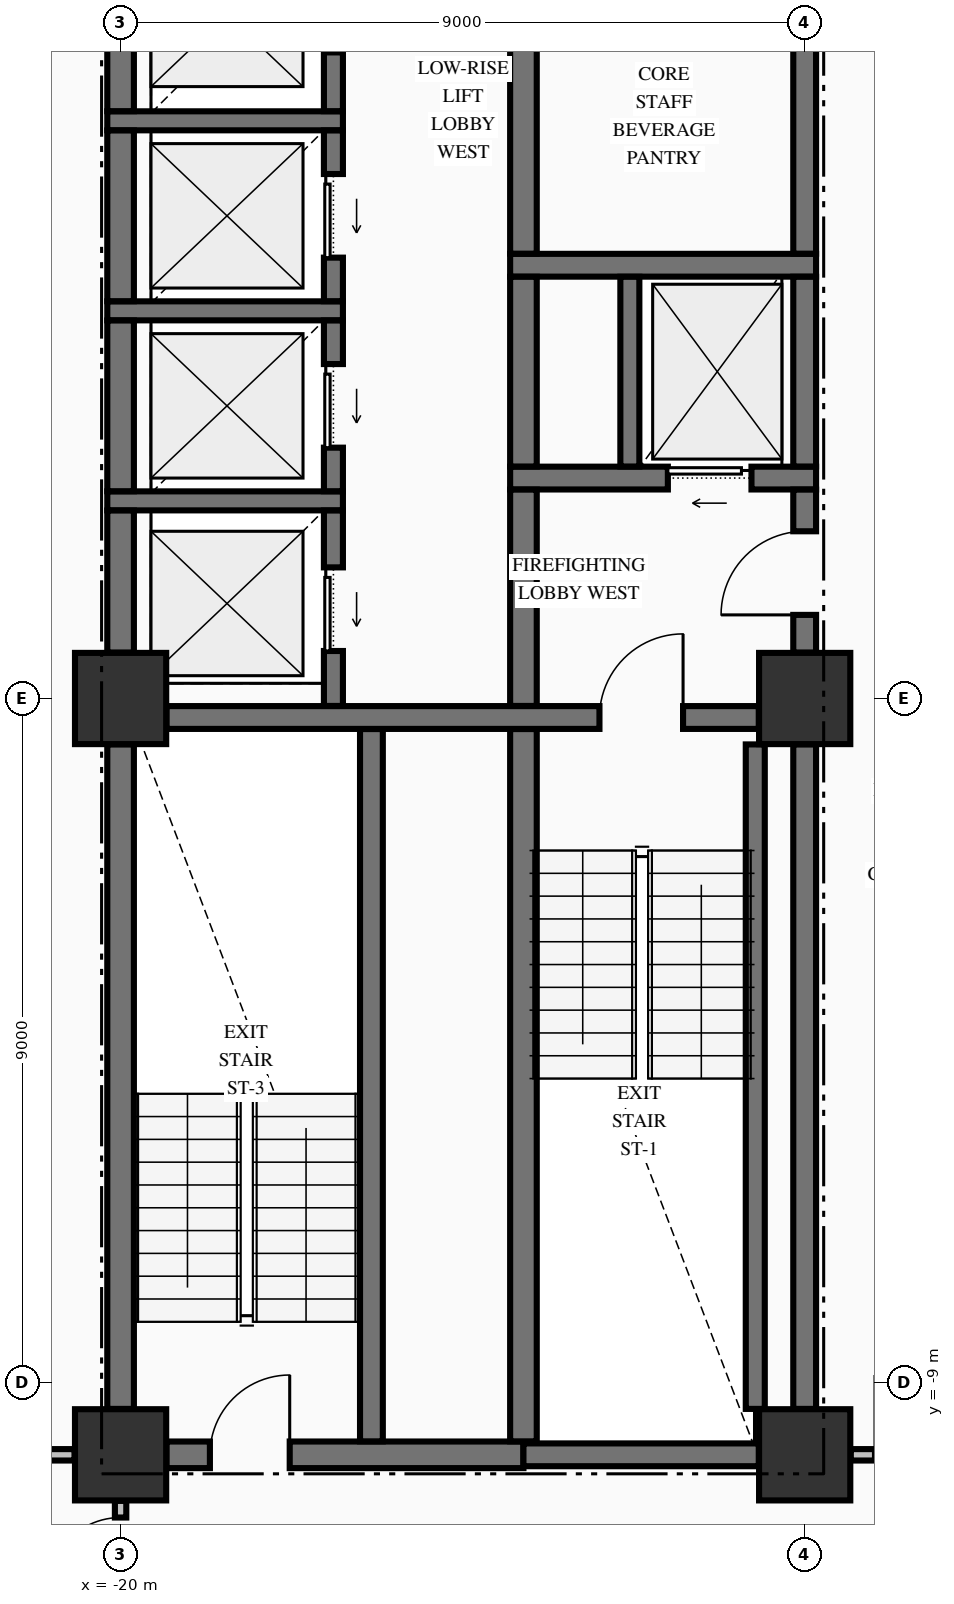
"""IFC4 building model, lengths in metres.
Left out: names, types, materials, properties, quantities, classifications, styles, units other than length and angle.
Written with IfcOpenShell. Run it as: python <this file> out.ifc"""

import sys

from ifc_helpers import new_model, si_unit, direction, frame, frame_2d, origin, origin_2d, place, context, subcontext, project, spatial, rectangle, extrude, element, fill, save


model = new_model("IFC4")
c1 = context("Model", 3, precision=1e-05, world=origin(), true_north=direction((0.0, 1.0)))
c2 = subcontext(c1, "Body", "Model", "MODEL_VIEW")
j1 = project(units=[si_unit("LENGTHUNIT", "METRE"), si_unit("PLANEANGLEUNIT", "RADIAN")], contexts=[c1])
p1 = place(None, origin())
s1 = spatial("IfcSite", under=j1, at=p1, CompositionType="ELEMENT")
p2 = place(p1, origin())
s2 = spatial("IfcBuilding", under=s1, at=p2, CompositionType="ELEMENT")
p3 = place(p2, frame((0.0, 0.0, 30.77)))
s3 = spatial("IfcBuildingStorey", under=s2, at=p3, CompositionType="ELEMENT", Elevation=30.77)
for number, where, z_axis, x_axis in (
    (1, (-20.0, -9.95, -0.25), (0.0, 0.0, 1.0), (1.0, 0.0, 0.0)),
    (2, (-11.0, -9.95, -0.25), (0.0, 0.0, 1.0), (1.0, 0.0, 0.0)),
    (3, (-11.0, 0.0, -0.25), (0.0, 0.0, 1.0), (1.0, 0.0, 0.0)),
    (4, (-20.0, 0.0, -0.25), (0.0, 0.0, 1.0), (1.0, 0.0, 0.0)),
):
    element("IfcColumn", number, at=place(p3, frame(where, z_axis=z_axis, x_axis=x_axis)), inside=s3, PredefinedType="COLUMN", context=c2, shape_type="SweptSolid", body=[
        extrude(rectangle(XDim=1.2, YDim=1.2, at=origin_2d()), origin(), (0.0, 0.0, 1.0), 3.52),
    ])
p4 = place(p3, frame((-19.396, -9.95, 0.0), z_axis=(0.0, 0.0, 1.0), x_axis=(1.0, 0.0, 0.0)))
e5 = element("IfcWall", 5, at=p4, inside=s3, PredefinedType="SHEAR", context=c2, shape_type="SweptSolid", body=[
    extrude(rectangle(XDim=4.696, YDim=0.35, at=frame_2d((2.348, 0.0))), origin(), (0.0, 0.0, 1.0), 3.27),
])
p5 = place(p4, frame((0.571, 0.0, 0.0)))
e6 = element("IfcOpeningElement", 6, at=p5, cuts=e5, PredefinedType="OPENING", context=c2, shape_type="SweptSolid", body=[
    extrude(rectangle(XDim=1.05, YDim=2.15, at=frame_2d((0.525, 1.075))), frame((0.0, 0.185, 0.0), z_axis=(0.0, -1.0, 0.0), x_axis=(1.0, 0.0, 0.0)), (0.0, 0.0, 1.0), 0.37),
])
p6 = place(p3, frame((-14.7, -9.95, 0.0), z_axis=(0.0, 0.0, 1.0), x_axis=(1.0, 0.0, 0.0)))
e7 = element("IfcWall", 7, at=p6, inside=s3, PredefinedType="SHEAR", context=c2, shape_type="SweptSolid", body=[
    extrude(rectangle(XDim=3.096, YDim=0.3, at=frame_2d((1.548, 0.0))), origin(), (0.0, 0.0, 1.0), 3.27),
])
p7 = place(p3, frame((-19.396, -0.25, 0.0), z_axis=(0.0, 0.0, 1.0), x_axis=(1.0, 0.0, 0.0)))
e8 = element("IfcWall", 8, at=p7, inside=s3, PredefinedType="SHEAR", context=c2, shape_type="SweptSolid", body=[
    extrude(rectangle(XDim=7.792, YDim=0.3, at=frame_2d((3.896, 0.0))), origin(), (0.0, 0.0, 1.0), 3.27),
])
p8 = place(p7, frame((5.696, 0.0, 0.0)))
e9 = element("IfcOpeningElement", 9, at=p8, cuts=e8, PredefinedType="OPENING", context=c2, shape_type="SweptSolid", body=[
    extrude(rectangle(XDim=1.1, YDim=2.15, at=frame_2d((0.55, 1.075))), frame((0.0, 0.16, 0.0), z_axis=(0.0, -1.0, 0.0), x_axis=(1.0, 0.0, 0.0)), (0.0, 0.0, 1.0), 0.32),
])
p9 = place(p3, frame((-20.175, 2.6, 0.0), z_axis=(0.0, 0.0, 1.0), x_axis=(1.0, 0.0, 0.0)))
e10 = element("IfcWall", 10, at=p9, inside=s3, PredefinedType="SOLIDWALL", context=c2, shape_type="SweptSolid", body=[
    extrude(rectangle(XDim=3.1, YDim=0.25, at=frame_2d((1.55, 0.0))), origin(), (0.0, 0.0, 1.0), 3.27),
])
p10 = place(p3, frame((-14.875, 2.9, 0.0), z_axis=(0.0, 0.0, 1.0), x_axis=(1.0, 0.0, 0.0)))
e11 = element("IfcWall", 11, at=p10, inside=s3, PredefinedType="SHEAR", context=c2, shape_type="SweptSolid", body=[
    extrude(rectangle(XDim=4.025, YDim=0.3, at=frame_2d((2.012, 0.0))), origin(), (0.0, 0.0, 1.0), 3.27),
])
p11 = place(p10, frame((2.075, 0.0, 0.0)))
e12 = element("IfcOpeningElement", 12, at=p11, cuts=e11, PredefinedType="OPENING", context=c2, shape_type="SweptSolid", body=[
    extrude(rectangle(XDim=1.1, YDim=2.2, at=frame_2d((0.55, 1.1))), frame((0.0, 0.16, 0.0), z_axis=(0.0, -1.0, 0.0), x_axis=(1.0, 0.0, 0.0)), (0.0, 0.0, 1.0), 0.32),
])
p12 = place(p3, frame((-20.175, 5.1, 0.0), z_axis=(0.0, 0.0, 1.0), x_axis=(1.0, 0.0, 0.0)))
e13 = element("IfcWall", 13, at=p12, inside=s3, PredefinedType="SOLIDWALL", context=c2, shape_type="SweptSolid", body=[
    extrude(rectangle(XDim=3.1, YDim=0.25, at=frame_2d((1.55, 0.0))), origin(), (0.0, 0.0, 1.0), 3.27),
])
p13 = place(p3, frame((-14.875, 5.7, 0.0), z_axis=(0.0, 0.0, 1.0), x_axis=(1.0, 0.0, 0.0)))
e14 = element("IfcWall", 14, at=p13, inside=s3, PredefinedType="SHEAR", context=c2, shape_type="SweptSolid", body=[
    extrude(rectangle(XDim=4.025, YDim=0.3, at=frame_2d((2.012, 0.0))), origin(), (0.0, 0.0, 1.0), 3.27),
])
p14 = place(p3, frame((-20.175, 7.6, 0.0), z_axis=(0.0, 0.0, 1.0), x_axis=(1.0, 0.0, 0.0)))
e15 = element("IfcWall", 15, at=p14, inside=s3, PredefinedType="SOLIDWALL", context=c2, shape_type="SweptSolid", body=[
    extrude(rectangle(XDim=3.1, YDim=0.25, at=frame_2d((1.55, 0.0))), origin(), (0.0, 0.0, 1.0), 3.27),
])
p15 = place(p3, frame((-23.835, -9.95, 0.0), z_axis=(0.0, 0.0, 1.0), x_axis=(1.0, 0.0, 0.0)))
e16 = element("IfcWall", 16, at=p15, inside=s3, PredefinedType="PARTITIONING", context=c2, shape_type="SweptSolid", body=[
    extrude(rectangle(XDim=3.229, YDim=0.15, at=frame_2d((1.615, 0.0))), origin(), (0.0, 0.0, 1.0), 3.27),
])
p16 = place(p15, frame((1.335, 0.0, 0.0)))
e17 = element("IfcOpeningElement", 17, at=p16, cuts=e16, PredefinedType="OPENING", context=c2, shape_type="SweptSolid", body=[
    extrude(rectangle(XDim=1.0, YDim=2.15, at=frame_2d((0.5, 1.075))), frame((0.0, 0.085, 0.0), z_axis=(0.0, -1.0, 0.0), x_axis=(1.0, 0.0, 0.0)), (0.0, 0.0, 1.0), 0.17),
])
p17 = place(p3, frame((-10.394, -9.95, 0.0), z_axis=(0.0, 0.0, 1.0), x_axis=(1.0, 0.0, 0.0)))
e18 = element("IfcWall", 18, at=p17, inside=s3, PredefinedType="PARTITIONING", context=c2, shape_type="SweptSolid", body=[
    extrude(rectangle(XDim=20.788, YDim=0.15, at=frame_2d((10.394, 0.0))), origin(), (0.0, 0.0, 1.0), 3.27),
])
p18 = place(p17, frame((0.319, 0.0, 0.0)))
e19 = element("IfcOpeningElement", 19, at=p18, cuts=e18, PredefinedType="OPENING", context=c2, shape_type="SweptSolid", body=[
    extrude(rectangle(XDim=1.05, YDim=2.15, at=frame_2d((0.525, 1.075))), frame((0.0, 0.085, 0.0), z_axis=(0.0, -1.0, 0.0), x_axis=(1.0, 0.0, 0.0)), (0.0, 0.0, 1.0), 0.17),
])
p19 = place(p17, frame((19.419, 0.0, 0.0)))
e20 = element("IfcOpeningElement", 20, at=p19, cuts=e18, PredefinedType="OPENING", context=c2, shape_type="SweptSolid", body=[
    extrude(rectangle(XDim=1.05, YDim=2.15, at=frame_2d((0.525, 1.075))), frame((0.0, 0.085, 0.0), z_axis=(0.0, -1.0, 0.0), x_axis=(1.0, 0.0, 0.0)), (0.0, 0.0, 1.0), 0.17),
])
p20 = place(p17, frame((11.569, 0.0, 0.0)))
e21 = element("IfcOpeningElement", 21, at=p20, cuts=e18, PredefinedType="OPENING", context=c2, shape_type="SweptSolid", body=[
    extrude(rectangle(XDim=0.95, YDim=2.15, at=frame_2d((0.475, 1.075))), frame((0.0, 0.085, 0.0), z_axis=(0.0, -1.0, 0.0), x_axis=(1.0, 0.0, 0.0)), (0.0, 0.0, 1.0), 0.17),
])
p21 = place(p3, frame((-20.0, -9.346, 0.0), z_axis=(0.0, 0.0, 1.0), x_axis=(0.0, 1.0, 0.0)))
e22 = element("IfcWall", 22, at=p21, inside=s3, PredefinedType="SHEAR", context=c2, shape_type="SweptSolid", body=[
    extrude(rectangle(XDim=8.742, YDim=0.35, at=frame_2d((4.371, 0.0))), origin(), (0.0, 0.0, 1.0), 3.27),
])
p22 = place(p3, frame((-20.0, 0.604, 0.0), z_axis=(0.0, 0.0, 1.0), x_axis=(0.0, 1.0, 0.0)))
e23 = element("IfcWall", 23, at=p22, inside=s3, PredefinedType="SHEAR", context=c2, shape_type="SweptSolid", body=[
    extrude(rectangle(XDim=1.869, YDim=0.35, at=frame_2d((0.935, 0.0))), origin(), (0.0, 0.0, 1.0), 3.27),
])
for number, where, z_axis, x_axis in (
    (24, (-20.0, 2.727, 0.0), (0.0, 0.0, 1.0), (0.0, 1.0, 0.0)),
    (25, (-20.0, 5.227, 0.0), (0.0, 0.0, 1.0), (0.0, 1.0, 0.0)),
):
    element("IfcWall", number, at=place(p3, frame(where, z_axis=z_axis, x_axis=x_axis)), inside=s3, PredefinedType="SHEAR", context=c2, shape_type="SweptSolid", body=[
        extrude(rectangle(XDim=2.246, YDim=0.35, at=frame_2d((1.123, 0.0))), origin(), (0.0, 0.0, 1.0), 3.27),
    ])
p23 = place(p3, frame((-20.0, 7.727, 0.0), z_axis=(0.0, 0.0, 1.0), x_axis=(0.0, 1.0, 0.0)))
e26 = element("IfcWall", 26, at=p23, inside=s3, PredefinedType="SHEAR", context=c2, shape_type="SweptSolid", body=[
    extrude(rectangle(XDim=2.169, YDim=0.35, at=frame_2d((1.084, 0.0))), origin(), (0.0, 0.0, 1.0), 3.27),
])
p24 = place(p3, frame((-17.2, -0.098, 0.0), z_axis=(0.0, 0.0, 1.0), x_axis=(0.0, 1.0, 0.0)))
e27 = element("IfcWall", 27, at=p24, inside=s3, PredefinedType="SOLIDWALL", context=c2, shape_type="SweptSolid", body=[
    extrude(rectangle(XDim=2.571, YDim=0.25, at=frame_2d((1.285, 0.0))), origin(), (0.0, 0.0, 1.0), 3.27),
])
p25 = place(p24, frame((0.723, 0.0, 0.0)))
e28 = element("IfcOpeningElement", 28, at=p25, cuts=e27, PredefinedType="OPENING", context=c2, shape_type="SweptSolid", body=[
    extrude(rectangle(XDim=1.1, YDim=2.2, at=frame_2d((0.55, 1.1))), frame((0.0, 0.135, 0.0), z_axis=(0.0, -1.0, 0.0), x_axis=(1.0, 0.0, 0.0)), (0.0, 0.0, 1.0), 0.27),
])
p26 = place(p3, frame((-17.2, 2.727, 0.0), z_axis=(0.0, 0.0, 1.0), x_axis=(0.0, 1.0, 0.0)))
e29 = element("IfcWall", 29, at=p26, inside=s3, PredefinedType="SOLIDWALL", context=c2, shape_type="SweptSolid", body=[
    extrude(rectangle(XDim=2.246, YDim=0.25, at=frame_2d((1.123, 0.0))), origin(), (0.0, 0.0, 1.0), 3.27),
])
p27 = place(p26, frame((0.573, 0.0, 0.0)))
e30 = element("IfcOpeningElement", 30, at=p27, cuts=e29, PredefinedType="OPENING", context=c2, shape_type="SweptSolid", body=[
    extrude(rectangle(XDim=1.1, YDim=2.2, at=frame_2d((0.55, 1.1))), frame((0.0, 0.135, 0.0), z_axis=(0.0, -1.0, 0.0), x_axis=(1.0, 0.0, 0.0)), (0.0, 0.0, 1.0), 0.27),
])
p28 = place(p3, frame((-17.2, 5.227, 0.0), z_axis=(0.0, 0.0, 1.0), x_axis=(0.0, 1.0, 0.0)))
e31 = element("IfcWall", 31, at=p28, inside=s3, PredefinedType="SOLIDWALL", context=c2, shape_type="SweptSolid", body=[
    extrude(rectangle(XDim=2.246, YDim=0.25, at=frame_2d((1.123, 0.0))), origin(), (0.0, 0.0, 1.0), 3.27),
])
p29 = place(p28, frame((0.573, 0.0, 0.0)))
e32 = element("IfcOpeningElement", 32, at=p29, cuts=e31, PredefinedType="OPENING", context=c2, shape_type="SweptSolid", body=[
    extrude(rectangle(XDim=1.1, YDim=2.2, at=frame_2d((0.55, 1.1))), frame((0.0, 0.135, 0.0), z_axis=(0.0, -1.0, 0.0), x_axis=(1.0, 0.0, 0.0)), (0.0, 0.0, 1.0), 0.27),
])
p30 = place(p3, frame((-17.2, 7.727, 0.0), z_axis=(0.0, 0.0, 1.0), x_axis=(0.0, 1.0, 0.0)))
e33 = element("IfcWall", 33, at=p30, inside=s3, PredefinedType="SOLIDWALL", context=c2, shape_type="SweptSolid", body=[
    extrude(rectangle(XDim=2.596, YDim=0.25, at=frame_2d((1.298, 0.0))), origin(), (0.0, 0.0, 1.0), 3.27),
])
p31 = place(p30, frame((0.773, 0.0, 0.0)))
e34 = element("IfcOpeningElement", 34, at=p31, cuts=e33, PredefinedType="OPENING", context=c2, shape_type="SweptSolid", body=[
    extrude(rectangle(XDim=1.1, YDim=2.2, at=frame_2d((0.55, 1.1))), frame((0.0, 0.135, 0.0), z_axis=(0.0, -1.0, 0.0), x_axis=(1.0, 0.0, 0.0)), (0.0, 0.0, 1.0), 0.27),
])
p32 = place(p3, frame((-16.7, -9.773, 0.0), z_axis=(0.0, 0.0, 1.0), x_axis=(0.0, 1.0, 0.0)))
e35 = element("IfcWall", 35, at=p32, inside=s3, PredefinedType="SHEAR", context=c2, shape_type="SweptSolid", body=[
    extrude(rectangle(XDim=9.371, YDim=0.3, at=frame_2d((4.686, 0.0))), origin(), (0.0, 0.0, 1.0), 3.27),
])
p33 = place(p3, frame((-14.7, -9.773, 0.0), z_axis=(0.0, 0.0, 1.0), x_axis=(0.0, 1.0, 0.0)))
e36 = element("IfcWall", 36, at=p33, inside=s3, PredefinedType="SHEAR", context=c2, shape_type="SweptSolid", body=[
    extrude(rectangle(XDim=9.371, YDim=0.35, at=frame_2d((4.686, 0.0))), origin(), (0.0, 0.0, 1.0), 3.27),
])
p34 = place(p3, frame((-14.7, -0.098, 0.0), z_axis=(0.0, 0.0, 1.0), x_axis=(0.0, 1.0, 0.0)))
e37 = element("IfcWall", 37, at=p34, inside=s3, PredefinedType="SHEAR", context=c2, shape_type="SweptSolid", body=[
    extrude(rectangle(XDim=2.846, YDim=0.35, at=frame_2d((1.423, 0.0))), origin(), (0.0, 0.0, 1.0), 3.27),
])
p35 = place(p3, frame((-14.7, 3.052, 0.0), z_axis=(0.0, 0.0, 1.0), x_axis=(0.0, 1.0, 0.0)))
e38 = element("IfcWall", 38, at=p35, inside=s3, PredefinedType="SHEAR", context=c2, shape_type="SweptSolid", body=[
    extrude(rectangle(XDim=2.496, YDim=0.35, at=frame_2d((1.248, 0.0))), origin(), (0.0, 0.0, 1.0), 3.27),
])
p36 = place(p3, frame((-14.7, 5.852, 0.0), z_axis=(0.0, 0.0, 1.0), x_axis=(0.0, 1.0, 0.0)))
e39 = element("IfcWall", 39, at=p36, inside=s3, PredefinedType="SHEAR", context=c2, shape_type="SweptSolid", body=[
    extrude(rectangle(XDim=4.471, YDim=0.35, at=frame_2d((2.235, 0.0))), origin(), (0.0, 0.0, 1.0), 3.27),
])
p37 = place(p3, frame((-13.3, 3.052, 0.0), z_axis=(0.0, 0.0, 1.0), x_axis=(0.0, 1.0, 0.0)))
e40 = element("IfcWall", 40, at=p37, inside=s3, PredefinedType="SOLIDWALL", context=c2, shape_type="SweptSolid", body=[
    extrude(rectangle(XDim=2.496, YDim=0.25, at=frame_2d((1.248, 0.0))), origin(), (0.0, 0.0, 1.0), 3.27),
])
p38 = place(p3, frame((-11.65, -9.346, 0.0), z_axis=(0.0, 0.0, 1.0), x_axis=(0.0, 1.0, 0.0)))
e41 = element("IfcWall", 41, at=p38, inside=s3, PredefinedType="SOLIDWALL", context=c2, shape_type="SweptSolid", body=[
    extrude(rectangle(XDim=8.742, YDim=0.25, at=frame_2d((4.371, 0.0))), origin(), (0.0, 0.0, 1.0), 3.27),
])
p39 = place(p3, frame((-11.0, -9.346, 0.0), z_axis=(0.0, 0.0, 1.0), x_axis=(0.0, 1.0, 0.0)))
e42 = element("IfcWall", 42, at=p39, inside=s3, PredefinedType="SHEAR", context=c2, shape_type="SweptSolid", body=[
    extrude(rectangle(XDim=8.742, YDim=0.3, at=frame_2d((4.371, 0.0))), origin(), (0.0, 0.0, 1.0), 3.27),
])
p40 = place(p3, frame((-11.0, 0.604, 0.0), z_axis=(0.0, 0.0, 1.0), x_axis=(0.0, 1.0, 0.0)))
e43 = element("IfcWall", 43, at=p40, inside=s3, PredefinedType="SHEAR", context=c2, shape_type="SweptSolid", body=[
    extrude(rectangle(XDim=2.144, YDim=0.3, at=frame_2d((1.072, 0.0))), origin(), (0.0, 0.0, 1.0), 3.27),
])
p41 = place(p40, frame((0.496, 0.0, 0.0)))
e44 = element("IfcOpeningElement", 44, at=p41, cuts=e43, PredefinedType="OPENING", context=c2, shape_type="SweptSolid", body=[
    extrude(rectangle(XDim=1.1, YDim=2.15, at=frame_2d((0.55, 1.075))), frame((0.0, 0.16, 0.0), z_axis=(0.0, -1.0, 0.0), x_axis=(1.0, 0.0, 0.0)), (0.0, 0.0, 1.0), 0.32),
])
p42 = place(p3, frame((-11.0, 3.052, 0.0), z_axis=(0.0, 0.0, 1.0), x_axis=(0.0, 1.0, 0.0)))
e45 = element("IfcWall", 45, at=p42, inside=s3, PredefinedType="SHEAR", context=c2, shape_type="SweptSolid", body=[
    extrude(rectangle(XDim=2.496, YDim=0.3, at=frame_2d((1.248, 0.0))), origin(), (0.0, 0.0, 1.0), 3.27),
])
p43 = place(p3, frame((-11.0, 5.852, 0.0), z_axis=(0.0, 0.0, 1.0), x_axis=(0.0, 1.0, 0.0)))
e46 = element("IfcWall", 46, at=p43, inside=s3, PredefinedType="SHEAR", context=c2, shape_type="SweptSolid", body=[
    extrude(rectangle(XDim=4.044, YDim=0.3, at=frame_2d((2.022, 0.0))), origin(), (0.0, 0.0, 1.0), 3.27),
])
p44 = place(p3, frame((-20.0, -12.472, 0.0), z_axis=(0.0, 0.0, 1.0), x_axis=(0.0, 1.0, 0.0)))
e47 = element("IfcWall", 47, at=p44, inside=s3, PredefinedType="PARTITIONING", context=c2, shape_type="SweptSolid", body=[
    extrude(rectangle(XDim=1.916, YDim=0.15, at=frame_2d((0.958, 0.0))), origin(), (0.0, 0.0, 1.0), 3.27),
])
p45 = place(p44, frame((0.747, 0.0, 0.0)))
e48 = element("IfcOpeningElement", 48, at=p45, cuts=e47, PredefinedType="OPENING", context=c2, shape_type="SweptSolid", body=[
    extrude(rectangle(XDim=0.95, YDim=2.15, at=frame_2d((0.475, 1.075))), frame((0.0, 0.085, 0.0), z_axis=(0.0, -1.0, 0.0), x_axis=(1.0, 0.0, 0.0)), (0.0, 0.0, 1.0), 0.17),
])
p46 = place(p8, origin())
e49 = element("IfcDoor", 49, at=p46, inside=s3, OperationType="SINGLE_SWING_RIGHT", PredefinedType="DOOR", context=c2, shape_type="SweptSolid", body=[
    extrude(rectangle(XDim=1.1, YDim=2.15, at=frame_2d((0.55, 1.075))), frame((0.0, 0.025, 0.0), z_axis=(0.0, -1.0, 0.0), x_axis=(1.0, 0.0, 0.0)), (0.0, 0.0, 1.0), 0.05),
])
fill(e9, e49)
p47 = place(p41, origin())
e50 = element("IfcDoor", 50, at=p47, inside=s3, OperationType="SINGLE_SWING_LEFT", PredefinedType="DOOR", context=c2, shape_type="SweptSolid", body=[
    extrude(rectangle(XDim=1.1, YDim=2.15, at=frame_2d((0.55, 1.075))), frame((0.0, 0.025, 0.0), z_axis=(0.0, -1.0, 0.0), x_axis=(1.0, 0.0, 0.0)), (0.0, 0.0, 1.0), 0.05),
])
fill(e44, e50)
p48 = place(p11, origin())
e51 = element("IfcDoor", 51, at=p48, inside=s3, OperationType="SLIDING_TO_LEFT", PredefinedType="DOOR", context=c2, shape_type="SweptSolid", body=[
    extrude(rectangle(XDim=1.1, YDim=2.2, at=frame_2d((0.55, 1.1))), frame((0.0, 0.025, 0.0), z_axis=(0.0, -1.0, 0.0), x_axis=(1.0, 0.0, 0.0)), (0.0, 0.0, 1.0), 0.05),
])
fill(e12, e51)
p49 = place(p5, origin())
e52 = element("IfcDoor", 52, at=p49, inside=s3, OperationType="SINGLE_SWING_RIGHT", PredefinedType="DOOR", context=c2, shape_type="SweptSolid", body=[
    extrude(rectangle(XDim=1.05, YDim=2.15, at=frame_2d((0.525, 1.075))), frame((0.0, 0.025, 0.0), z_axis=(0.0, -1.0, 0.0), x_axis=(1.0, 0.0, 0.0)), (0.0, 0.0, 1.0), 0.05),
])
fill(e6, e52)
p50 = place(p25, origin())
e53 = element("IfcDoor", 53, at=p50, inside=s3, OperationType="SLIDING_TO_LEFT", PredefinedType="DOOR", context=c2, shape_type="SweptSolid", body=[
    extrude(rectangle(XDim=1.1, YDim=2.2, at=frame_2d((0.55, 1.1))), frame((0.0, 0.025, 0.0), z_axis=(0.0, -1.0, 0.0), x_axis=(1.0, 0.0, 0.0)), (0.0, 0.0, 1.0), 0.05),
])
fill(e28, e53)
p51 = place(p27, origin())
e54 = element("IfcDoor", 54, at=p51, inside=s3, OperationType="SLIDING_TO_LEFT", PredefinedType="DOOR", context=c2, shape_type="SweptSolid", body=[
    extrude(rectangle(XDim=1.1, YDim=2.2, at=frame_2d((0.55, 1.1))), frame((0.0, 0.025, 0.0), z_axis=(0.0, -1.0, 0.0), x_axis=(1.0, 0.0, 0.0)), (0.0, 0.0, 1.0), 0.05),
])
fill(e30, e54)
p52 = place(p29, origin())
e55 = element("IfcDoor", 55, at=p52, inside=s3, OperationType="SLIDING_TO_LEFT", PredefinedType="DOOR", context=c2, shape_type="SweptSolid", body=[
    extrude(rectangle(XDim=1.1, YDim=2.2, at=frame_2d((0.55, 1.1))), frame((0.0, 0.025, 0.0), z_axis=(0.0, -1.0, 0.0), x_axis=(1.0, 0.0, 0.0)), (0.0, 0.0, 1.0), 0.05),
])
fill(e32, e55)
p53 = place(p45, origin())
e56 = element("IfcDoor", 56, at=p53, inside=s3, OperationType="SINGLE_SWING_LEFT", PredefinedType="DOOR", context=c2, shape_type="SweptSolid", body=[
    extrude(rectangle(XDim=0.95, YDim=2.15, at=frame_2d((0.475, 1.075))), frame((0.0, 0.025, 0.0), z_axis=(0.0, -1.0, 0.0), x_axis=(1.0, 0.0, 0.0)), (0.0, 0.0, 1.0), 0.05),
])
fill(e48, e56)
save(model, sys.argv[1])
